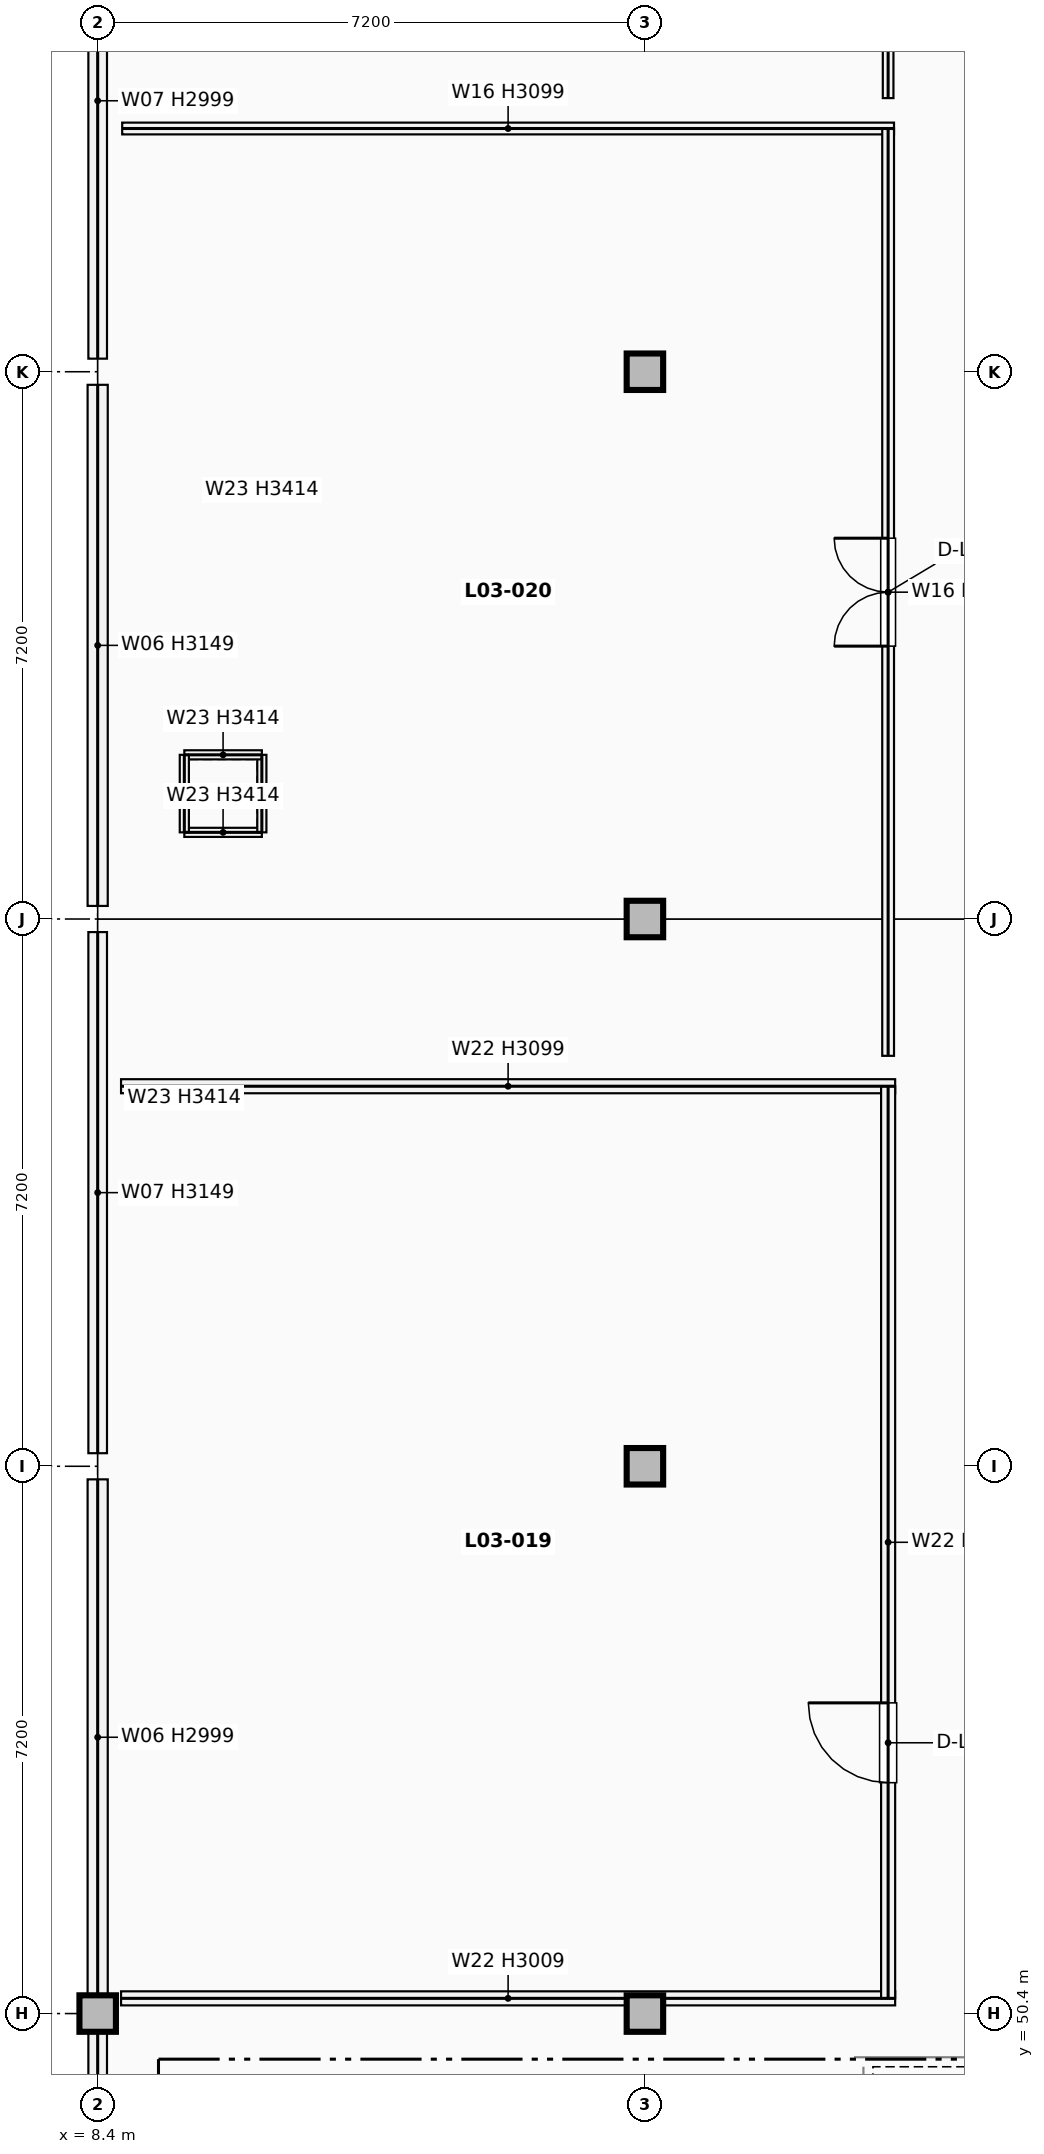
"""IFC4 building model, lengths in metres.
Left out: names, types, materials, properties, quantities, classifications, styles, units other than length and angle.
Written with IfcOpenShell. Run it as: python <this file> out.ifc"""

import sys

from ifc_helpers import new_model, si_unit, direction, frame, frame_2d, origin, origin_2d, place, context, subcontext, project, spatial, rectangle, extrude, element, fill, save


model = new_model("IFC4")
c1 = context("Model", 3, precision=1e-05, world=origin(), true_north=direction((0.0, 1.0)))
c2 = subcontext(c1, "Body", "Model", "MODEL_VIEW")
j1 = project(units=[si_unit("LENGTHUNIT", "METRE"), si_unit("PLANEANGLEUNIT", "RADIAN")], contexts=[c1])
p1 = place(None, origin())
s1 = spatial("IfcSite", under=j1, at=p1, CompositionType="ELEMENT")
p2 = place(p1, origin())
s2 = spatial("IfcBuilding", under=s1, at=p2, CompositionType="ELEMENT")
p3 = place(p2, frame((0.0, 0.0, 13.6)))
s3 = spatial("IfcBuildingStorey", under=s2, at=p3, CompositionType="ELEMENT", Elevation=13.6)
for number, where, z_axis, x_axis in (
    (1, (8.4, 50.4, 0.0), (0.0, 0.0, 1.0), (1.0, 0.0, 0.0)),
    (2, (15.6, 50.4, 0.0), (0.0, 0.0, 1.0), (1.0, 0.0, 0.0)),
    (3, (15.6, 57.6, 0.0), (0.0, 0.0, 1.0), (1.0, 0.0, 0.0)),
    (4, (15.6, 64.8, 0.0), (0.0, 0.0, 1.0), (1.0, 0.0, 0.0)),
    (5, (15.6, 72.0, 0.0), (0.0, 0.0, 1.0), (1.0, 0.0, 0.0)),
):
    element("IfcColumn", number, at=place(p3, frame(where, z_axis=z_axis, x_axis=x_axis)), inside=s3, PredefinedType="COLUMN", context=c2, shape_type="SweptSolid", body=[
        extrude(rectangle(XDim=0.48, YDim=0.48, at=origin_2d()), origin(), (0.0, 0.0, 1.0), 3.74),
    ])
p4 = place(p3, frame((8.4, 44.642, 0.0), z_axis=(0.0, 0.0, 1.0), x_axis=(0.0, 1.0, 0.0)))
e6 = element("IfcWall", 6, at=p4, inside=s3, PredefinedType="SOLIDWALL", context=c2, shape_type="SweptSolid", body=[
    extrude(rectangle(XDim=5.516, YDim=0.245, at=frame_2d((2.758, 0.0))), origin(), (0.0, 0.0, 1.0), 2.999),
])
p5 = place(p3, frame((8.4, 50.642, 0.0), z_axis=(0.0, 0.0, 1.0), x_axis=(0.0, 1.0, 0.0)))
e7 = element("IfcWall", 7, at=p5, inside=s3, PredefinedType="SOLIDWALL", context=c2, shape_type="SweptSolid", body=[
    extrude(rectangle(XDim=6.786, YDim=0.265, at=frame_2d((3.393, 0.0))), origin(), (0.0, 0.0, 1.0), 2.999),
])
p6 = place(p3, frame((8.4, 57.772, 0.0), z_axis=(0.0, 0.0, 1.0), x_axis=(0.0, 1.0, 0.0)))
e8 = element("IfcWall", 8, at=p6, inside=s3, PredefinedType="SOLIDWALL", context=c2, shape_type="SweptSolid", body=[
    extrude(rectangle(XDim=6.856, YDim=0.245, at=frame_2d((3.428, 0.0))), origin(), (0.0, 0.0, 1.0), 3.149),
])
p7 = place(p3, frame((8.4, 64.972, 0.0), z_axis=(0.0, 0.0, 1.0), x_axis=(0.0, 1.0, 0.0)))
e9 = element("IfcWall", 9, at=p7, inside=s3, PredefinedType="SOLIDWALL", context=c2, shape_type="SweptSolid", body=[
    extrude(rectangle(XDim=6.856, YDim=0.265, at=frame_2d((3.428, 0.0))), origin(), (0.0, 0.0, 1.0), 3.149),
])
p8 = place(p3, frame((8.4, 72.172, 0.0), z_axis=(0.0, 0.0, 1.0), x_axis=(0.0, 1.0, 0.0)))
e10 = element("IfcWall", 10, at=p8, inside=s3, PredefinedType="SOLIDWALL", context=c2, shape_type="SweptSolid", body=[
    extrude(rectangle(XDim=6.786, YDim=0.245, at=frame_2d((3.393, 0.0))), origin(), (0.0, 0.0, 1.0), 2.999),
])
for number, where, z_axis, x_axis in (
    (11, (9.54, 65.94, 0.0), (0.0, 0.0, 1.0), (1.0, 0.0, 0.0)),
    (12, (10.56, 65.94, 0.0), (0.0, 0.0, 1.0), (0.0, 1.0, 0.0)),
    (13, (10.56, 66.96, 0.0), (0.0, 0.0, 1.0), (-1.0, 0.0, 0.0)),
    (14, (9.54, 66.96, 0.0), (0.0, 0.0, 1.0), (0.0, -1.0, 0.0)),
):
    element("IfcWall", number, at=place(p3, frame(where, z_axis=z_axis, x_axis=x_axis)), inside=s3, PredefinedType="PARTITIONING", context=c2, shape_type="SweptSolid", body=[
        extrude(rectangle(XDim=1.02, YDim=0.12, at=frame_2d((0.51, 0.0))), origin(), (0.0, 0.0, 1.0), 3.414),
    ])
p9 = place(p3, frame((18.475, 48.1, 0.0), z_axis=(0.0, 0.0, 1.0), x_axis=(0.0, 1.0, 0.0)))
e15 = element("IfcWall", 15, at=p9, inside=s3, PredefinedType="SHEAR", context=c2, shape_type="SweptSolid", body=[
    extrude(rectangle(XDim=1.6, YDim=0.25, at=frame_2d((0.8, 0.0))), origin(), (0.0, 0.0, 1.0), 3.74),
])
p10 = place(p3, frame((18.35, 49.825, 0.0), z_axis=(0.0, 0.0, 1.0), x_axis=(1.0, 0.0, 0.0)))
e16 = element("IfcWall", 16, at=p10, inside=s3, PredefinedType="SHEAR", context=c2, shape_type="SweptSolid", body=[
    extrude(rectangle(XDim=3.1, YDim=0.25, at=frame_2d((1.55, 0.0))), origin(), (0.0, 0.0, 1.0), 3.74),
])
p11 = place(p3, frame((8.708, 50.6, 0.0), z_axis=(0.0, 0.0, 1.0), x_axis=(1.0, 0.0, 0.0)))
e17 = element("IfcWall", 17, at=p11, inside=s3, PredefinedType="PARTITIONING", context=c2, shape_type="SweptSolid", body=[
    extrude(rectangle(XDim=10.185, YDim=0.185, at=frame_2d((5.093, 0.0))), origin(), (0.0, 0.0, 1.0), 3.009),
])
p12 = place(p3, frame((8.708, 62.6, 0.0), z_axis=(0.0, 0.0, 1.0), x_axis=(1.0, 0.0, 0.0)))
e18 = element("IfcWall", 18, at=p12, inside=s3, PredefinedType="PARTITIONING", context=c2, shape_type="SweptSolid", body=[
    extrude(rectangle(XDim=10.185, YDim=0.185, at=frame_2d((5.093, 0.0))), origin(), (0.0, 0.0, 1.0), 3.099),
])
p13 = place(p3, frame((18.8, 50.6, 0.0), z_axis=(0.0, 0.0, 1.0), x_axis=(0.0, 1.0, 0.0)))
e19 = element("IfcWall", 19, at=p13, inside=s3, PredefinedType="PARTITIONING", context=c2, shape_type="SweptSolid", body=[
    extrude(rectangle(XDim=12.0, YDim=0.185, at=frame_2d((6.0, 0.0))), origin(), (0.0, 0.0, 1.0), 3.009),
])
p14 = place(p13, frame((2.837, 0.0, 0.0)))
e20 = element("IfcOpeningElement", 20, at=p14, cuts=e19, PredefinedType="OPENING", context=c2, shape_type="SweptSolid", body=[
    extrude(rectangle(XDim=1.05, YDim=2.15, at=frame_2d((0.525, 1.075))), frame((0.0, 0.103, 0.0), z_axis=(0.0, -1.0, 0.0), x_axis=(1.0, 0.0, 0.0)), (0.0, 0.0, 1.0), 0.205),
])
p15 = place(p3, frame((8.722, 75.2, 0.0), z_axis=(0.0, 0.0, 1.0), x_axis=(1.0, 0.0, 0.0)))
e21 = element("IfcWall", 21, at=p15, inside=s3, PredefinedType="PARTITIONING", context=c2, shape_type="SweptSolid", body=[
    extrude(rectangle(XDim=10.155, YDim=0.155, at=frame_2d((5.078, 0.0))), origin(), (0.0, 0.0, 1.0), 3.099),
])
p16 = place(p3, frame((18.8, 63.0, 0.0), z_axis=(0.0, 0.0, 1.0), x_axis=(0.0, 1.0, 0.0)))
e22 = element("IfcWall", 22, at=p16, inside=s3, PredefinedType="PARTITIONING", context=c2, shape_type="SweptSolid", body=[
    extrude(rectangle(XDim=12.2, YDim=0.155, at=frame_2d((6.1, 0.0))), origin(), (0.0, 0.0, 1.0), 3.009),
])
p17 = place(p16, frame((5.39, 0.0, 0.0)))
e23 = element("IfcOpeningElement", 23, at=p17, cuts=e22, PredefinedType="OPENING", context=c2, shape_type="SweptSolid", body=[
    extrude(rectangle(XDim=1.42, YDim=2.26, at=frame_2d((0.71, 1.13))), frame((0.0, 0.087, 0.0), z_axis=(0.0, -1.0, 0.0), x_axis=(1.0, 0.0, 0.0)), (0.0, 0.0, 1.0), 0.175),
])
p18 = place(p3, frame((18.8, 75.6, 0.0), z_axis=(0.0, 0.0, 1.0), x_axis=(0.0, 1.0, 0.0)))
e24 = element("IfcWall", 24, at=p18, inside=s3, PredefinedType="PARTITIONING", context=c2, shape_type="SweptSolid", body=[
    extrude(rectangle(XDim=12.8, YDim=0.14, at=frame_2d((6.4, 0.0))), origin(), (0.0, 0.0, 1.0), 2.969),
])
p19 = place(p18, frame((8.615, 0.0, 0.0)))
e25 = element("IfcOpeningElement", 25, at=p19, cuts=e24, PredefinedType="OPENING", context=c2, shape_type="SweptSolid", body=[
    extrude(rectangle(XDim=1.18, YDim=2.14, at=frame_2d((0.59, 1.07))), frame((0.0, 0.08, 0.0), z_axis=(0.0, -1.0, 0.0), x_axis=(1.0, 0.0, 0.0)), (0.0, 0.0, 1.0), 0.16),
])
p20 = place(p14, origin())
e26 = element("IfcDoor", 26, at=p20, inside=s3, OperationType="SINGLE_SWING_RIGHT", PredefinedType="DOOR", context=c2, shape_type="SweptSolid", body=[
    extrude(rectangle(XDim=1.05, YDim=2.15, at=frame_2d((0.525, 1.075))), frame((0.0, 0.025, 0.0), z_axis=(0.0, -1.0, 0.0), x_axis=(1.0, 0.0, 0.0)), (0.0, 0.0, 1.0), 0.05),
])
fill(e20, e26)
p21 = place(p17, origin())
e27 = element("IfcDoor", 27, at=p21, inside=s3, OperationType="DOUBLE_DOOR_SINGLE_SWING", PredefinedType="DOOR", context=c2, shape_type="SweptSolid", body=[
    extrude(rectangle(XDim=1.42, YDim=2.26, at=frame_2d((0.71, 1.13))), frame((0.0, 0.025, 0.0), z_axis=(0.0, -1.0, 0.0), x_axis=(1.0, 0.0, 0.0)), (0.0, 0.0, 1.0), 0.05),
])
fill(e23, e27)
save(model, sys.argv[1])
